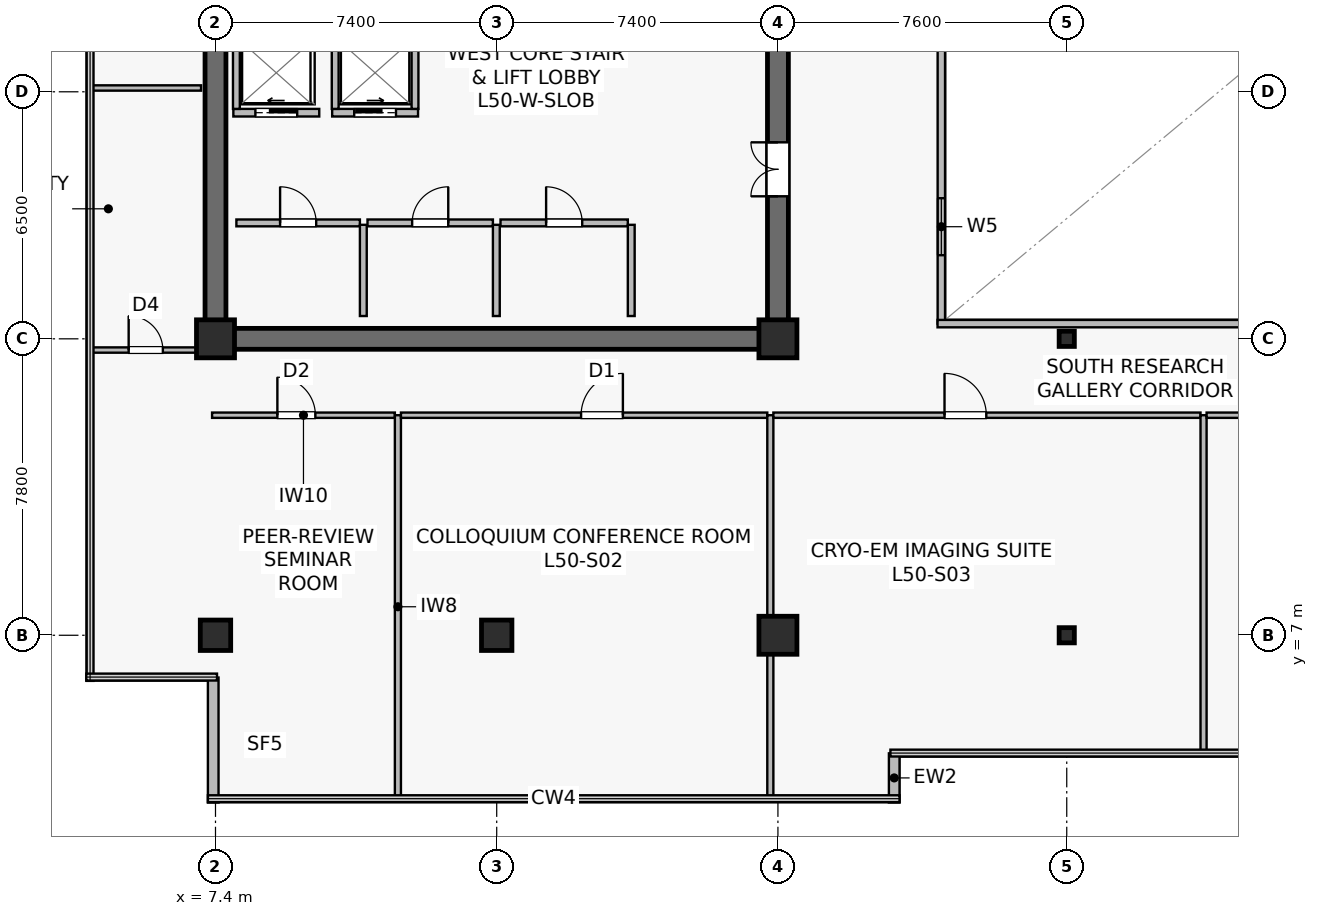
"""IFC4 building model, lengths in metres.
Left out: names, types, materials, properties, quantities, classifications, styles, units other than length and angle.
Written with IfcOpenShell. Run it as: python <this file> out.ifc"""

import sys

from ifc_helpers import new_model, si_unit, direction, frame, frame_2d, origin, origin_2d, place, context, subcontext, project, spatial, rectangle, hollow_rectangle, extrude, source, transform, mapped, element, fill, save


model = new_model("IFC4")
c1 = context("Model", 3, precision=1e-05, world=origin(), true_north=direction((0.0, 1.0)))
c2 = subcontext(c1, "Body", "Model", "MODEL_VIEW")
j1 = project(units=[si_unit("LENGTHUNIT", "METRE"), si_unit("PLANEANGLEUNIT", "RADIAN")], contexts=[c1])
p1 = place(None, origin())
s1 = spatial("IfcSite", under=j1, at=p1, CompositionType="ELEMENT")
p2 = place(p1, origin())
s2 = spatial("IfcBuilding", under=s1, at=p2, CompositionType="ELEMENT")
p3 = place(p2, frame((0.0, 0.0, 209.6)))
s3 = spatial("IfcBuildingStorey", under=s2, at=p3, CompositionType="ELEMENT", Elevation=209.6)
p4 = place(p3, frame((7.125, 14.8, 0.0), z_axis=(0.0, 0.0, 1.0), x_axis=(1.0, 0.0, 0.0)))
e1 = element("IfcWall", 1, at=p4, inside=s3, PredefinedType="SHEAR", context=c2, shape_type="SweptSolid", body=[
    extrude(rectangle(XDim=15.35, YDim=0.55, at=frame_2d((7.675, 0.0))), origin(), (0.0, 0.0, 1.0), 3.8),
])
p5 = place(p3, frame((7.4, 15.075, 0.0), z_axis=(0.0, 0.0, 1.0), x_axis=(0.0, 1.0, 0.0)))
e2 = element("IfcWall", 2, at=p5, inside=s3, PredefinedType="SHEAR", context=c2, shape_type="SweptSolid", body=[
    extrude(rectangle(XDim=18.45, YDim=0.55, at=frame_2d((9.225, 0.0))), origin(), (0.0, 0.0, 1.0), 3.8),
])
p6 = place(p3, frame((22.2, 15.075, 0.0), z_axis=(0.0, 0.0, 1.0), x_axis=(0.0, 1.0, 0.0)))
e3 = element("IfcWall", 3, at=p6, inside=s3, PredefinedType="SHEAR", context=c2, shape_type="SweptSolid", body=[
    extrude(rectangle(XDim=18.45, YDim=0.55, at=frame_2d((9.225, 0.0))), origin(), (0.0, 0.0, 1.0), 3.8),
])
p7 = place(p6, frame((3.475, 0.0, 0.0)))
e4 = element("IfcOpeningElement", 4, at=p7, cuts=e3, PredefinedType="OPENING", context=c2, shape_type="SweptSolid", body=[
    extrude(rectangle(XDim=1.42, YDim=2.2, at=frame_2d((0.71, 1.1))), frame((0.0, 0.285, 0.0), z_axis=(0.0, -1.0, 0.0), x_axis=(1.0, 0.0, 0.0)), (0.0, 0.0, 1.0), 0.57),
])
m1 = source(origin(), c2, "Body", "SweptSolid", [
    extrude(rectangle(XDim=0.8, YDim=0.8, at=origin_2d()), origin(), (0.0, 0.0, 1.0), 4.1),
])
p8 = place(p3, frame((14.8, 7.0, 0.0), z_axis=(0.0, 0.0, 1.0), x_axis=(1.0, 0.0, 0.0)))
e5 = element("IfcColumn", 5, at=p8, inside=s3, PredefinedType="COLUMN", context=c2, shape_type="MappedRepresentation", body=[
    mapped(m1, transform((0.0, 0.0, 0.0), scale=1.0)),
])
m2 = source(origin(), c2, "Body", "SweptSolid", [
    extrude(rectangle(XDim=1.0, YDim=1.0, at=origin_2d()), origin(), (0.0, 0.0, 1.0), 4.1),
])
for number, where, z_axis, x_axis in (
    (6, (22.2, 7.0, 0.0), (0.0, 0.0, 1.0), (1.0, 0.0, 0.0)),
    (7, (7.4, 14.8, 0.0), (0.0, 0.0, 1.0), (1.0, 0.0, 0.0)),
    (8, (22.2, 14.8, 0.0), (0.0, 0.0, 1.0), (1.0, 0.0, 0.0)),
):
    element("IfcColumn", number, at=place(p3, frame(where, z_axis=z_axis, x_axis=x_axis)), inside=s3, PredefinedType="COLUMN", context=c2, shape_type="MappedRepresentation", body=[
        mapped(m2, transform((0.0, 0.0, 0.0), scale=1.0)),
    ])
p9 = place(p3, frame((7.4, 7.0, 0.0), z_axis=(0.0, 0.0, 1.0), x_axis=(1.0, 0.0, 0.0)))
e9 = element("IfcColumn", 9, at=p9, inside=s3, PredefinedType="COLUMN", context=c2, shape_type="MappedRepresentation", body=[
    mapped(m1, transform((0.0, 0.0, 0.0), scale=1.0)),
])
m3 = source(origin(), c2, "Body", "SweptSolid", [
    extrude(hollow_rectangle(XDim=0.4, YDim=0.4, WallThickness=0.019, at=origin_2d()), origin(), (0.0, 0.0, 1.0), 4.1),
])
for number, where, z_axis, x_axis in (
    (10, (29.8, 7.0, 0.0), (0.0, 0.0, 1.0), (1.0, 0.0, 0.0)),
    (11, (29.8, 14.8, 0.0), (0.0, 0.0, 1.0), (1.0, 0.0, 0.0)),
):
    element("IfcColumn", number, at=place(p3, frame(where, z_axis=z_axis, x_axis=x_axis)), inside=s3, PredefinedType="COLUMN", context=c2, shape_type="MappedRepresentation", body=[
        mapped(m3, transform((0.0, 0.0, 0.0), scale=1.0)),
    ])
p10 = place(p3, frame((25.26, 2.6, 0.0), z_axis=(0.0, 0.0, 1.0), x_axis=(0.0, 1.0, 0.0)))
e12 = element("IfcWall", 12, at=p10, inside=s3, PredefinedType="STANDARD", context=c2, shape_type="SweptSolid", body=[
    extrude(rectangle(XDim=1.293, YDim=0.28, at=frame_2d((0.646, 0.0))), origin(), (0.0, 0.0, 1.0), 3.8),
])
p11 = place(p3, frame((7.34, 5.888, 0.0), z_axis=(0.0, 0.0, 1.0), x_axis=(0.0, -1.0, 0.0)))
e13 = element("IfcWall", 13, at=p11, inside=s3, PredefinedType="STANDARD", context=c2, shape_type="SweptSolid", body=[
    extrude(rectangle(XDim=3.288, YDim=0.28, at=frame_2d((1.644, 0.0))), origin(), (0.0, 0.0, 1.0), 3.8),
])
p12 = place(p3, frame((7.87, 20.75, 0.0), z_axis=(0.0, 0.0, 1.0), x_axis=(1.0, 0.0, 0.0)))
e14 = element("IfcWall", 14, at=p12, inside=s3, PredefinedType="SOLIDWALL", context=c2, shape_type="SweptSolid", body=[
    extrude(rectangle(XDim=2.26, YDim=0.2, at=frame_2d((1.13, 0.0))), origin(), (0.0, 0.0, 1.0), 3.8),
])
p13 = place(p12, frame((0.58, 0.0, 0.0)))
e15 = element("IfcOpeningElement", 15, at=p13, cuts=e14, PredefinedType="OPENING", context=c2, shape_type="SweptSolid", body=[
    extrude(rectangle(XDim=1.1, YDim=2.22, at=frame_2d((0.55, 1.11))), frame((0.0, 0.11, 0.0), z_axis=(0.0, -1.0, 0.0), x_axis=(1.0, 0.0, 0.0)), (0.0, 0.0, 1.0), 0.22),
])
p14 = place(p3, frame((7.95, 20.85, 0.0), z_axis=(0.0, 0.0, 1.0), x_axis=(0.0, 1.0, 0.0)))
e16 = element("IfcWall", 16, at=p14, inside=s3, PredefinedType="SOLIDWALL", context=c2, shape_type="SweptSolid", body=[
    extrude(rectangle(XDim=1.9, YDim=0.18, at=frame_2d((0.95, 0.0))), origin(), (0.0, 0.0, 1.0), 3.8),
])
p15 = place(p3, frame((10.47, 20.75, 0.0), z_axis=(0.0, 0.0, 1.0), x_axis=(1.0, 0.0, 0.0)))
e17 = element("IfcWall", 17, at=p15, inside=s3, PredefinedType="SOLIDWALL", context=c2, shape_type="SweptSolid", body=[
    extrude(rectangle(XDim=2.26, YDim=0.2, at=frame_2d((1.13, 0.0))), origin(), (0.0, 0.0, 1.0), 3.8),
])
p16 = place(p15, frame((0.58, 0.0, 0.0)))
e18 = element("IfcOpeningElement", 18, at=p16, cuts=e17, PredefinedType="OPENING", context=c2, shape_type="SweptSolid", body=[
    extrude(rectangle(XDim=1.1, YDim=2.22, at=frame_2d((0.55, 1.11))), frame((0.0, 0.11, 0.0), z_axis=(0.0, -1.0, 0.0), x_axis=(1.0, 0.0, 0.0)), (0.0, 0.0, 1.0), 0.22),
])
for number, where, z_axis, x_axis in (
    (19, (10.55, 20.85, 0.0), (0.0, 0.0, 1.0), (0.0, 1.0, 0.0)),
    (20, (12.65, 20.85, 0.0), (0.0, 0.0, 1.0), (0.0, 1.0, 0.0)),
):
    element("IfcWall", number, at=place(p3, frame(where, z_axis=z_axis, x_axis=x_axis)), inside=s3, PredefinedType="SOLIDWALL", context=c2, shape_type="SweptSolid", body=[
        extrude(rectangle(XDim=1.9, YDim=0.18, at=frame_2d((0.95, 0.0))), origin(), (0.0, 0.0, 1.0), 3.8),
    ])
p17 = place(p3, frame((7.95, 17.85, 0.0), z_axis=(0.0, 0.0, 1.0), x_axis=(1.0, 0.0, 0.0)))
e21 = element("IfcWall", 21, at=p17, inside=s3, PredefinedType="SOLIDWALL", context=c2, shape_type="SweptSolid", body=[
    extrude(rectangle(XDim=3.25, YDim=0.18, at=frame_2d((1.625, 0.0))), origin(), (0.0, 0.0, 1.0), 3.8),
])
p18 = place(p17, frame((1.15, 0.0, 0.0)))
e22 = element("IfcOpeningElement", 22, at=p18, cuts=e21, PredefinedType="OPENING", context=c2, shape_type="SweptSolid", body=[
    extrude(rectangle(XDim=0.95, YDim=2.15, at=frame_2d((0.475, 1.075))), frame((0.0, 0.1, 0.0), z_axis=(0.0, -1.0, 0.0), x_axis=(1.0, 0.0, 0.0)), (0.0, 0.0, 1.0), 0.2),
])
p19 = place(p3, frame((11.29, 15.4, 0.0), z_axis=(0.0, 0.0, 1.0), x_axis=(0.0, 1.0, 0.0)))
e23 = element("IfcWall", 23, at=p19, inside=s3, PredefinedType="SOLIDWALL", context=c2, shape_type="SweptSolid", body=[
    extrude(rectangle(XDim=2.4, YDim=0.18, at=frame_2d((1.2, 0.0))), origin(), (0.0, 0.0, 1.0), 3.8),
])
p20 = place(p3, frame((11.4, 17.85, 0.0), z_axis=(0.0, 0.0, 1.0), x_axis=(1.0, 0.0, 0.0)))
e24 = element("IfcWall", 24, at=p20, inside=s3, PredefinedType="SOLIDWALL", context=c2, shape_type="SweptSolid", body=[
    extrude(rectangle(XDim=3.3, YDim=0.18, at=frame_2d((1.65, 0.0))), origin(), (0.0, 0.0, 1.0), 3.197),
])
p21 = place(p20, frame((1.175, 0.0, 0.0)))
e25 = element("IfcOpeningElement", 25, at=p21, cuts=e24, PredefinedType="OPENING", context=c2, shape_type="SweptSolid", body=[
    extrude(rectangle(XDim=0.95, YDim=2.15, at=frame_2d((0.475, 1.075))), frame((0.0, 0.1, 0.0), z_axis=(0.0, -1.0, 0.0), x_axis=(1.0, 0.0, 0.0)), (0.0, 0.0, 1.0), 0.2),
])
p22 = place(p3, frame((14.79, 15.4, 0.0), z_axis=(0.0, 0.0, 1.0), x_axis=(0.0, 1.0, 0.0)))
e26 = element("IfcWall", 26, at=p22, inside=s3, PredefinedType="SOLIDWALL", context=c2, shape_type="SweptSolid", body=[
    extrude(rectangle(XDim=2.4, YDim=0.18, at=frame_2d((1.2, 0.0))), origin(), (0.0, 0.0, 1.0), 3.197),
])
p23 = place(p3, frame((14.9, 17.85, 0.0), z_axis=(0.0, 0.0, 1.0), x_axis=(1.0, 0.0, 0.0)))
e27 = element("IfcWall", 27, at=p23, inside=s3, PredefinedType="SOLIDWALL", context=c2, shape_type="SweptSolid", body=[
    extrude(rectangle(XDim=3.35, YDim=0.18, at=frame_2d((1.675, 0.0))), origin(), (0.0, 0.0, 1.0), 3.197),
])
p24 = place(p23, frame((1.2, 0.0, 0.0)))
e28 = element("IfcOpeningElement", 28, at=p24, cuts=e27, PredefinedType="OPENING", context=c2, shape_type="SweptSolid", body=[
    extrude(rectangle(XDim=0.95, YDim=2.15, at=frame_2d((0.475, 1.075))), frame((0.0, 0.1, 0.0), z_axis=(0.0, -1.0, 0.0), x_axis=(1.0, 0.0, 0.0)), (0.0, 0.0, 1.0), 0.2),
])
p25 = place(p3, frame((18.34, 15.4, 0.0), z_axis=(0.0, 0.0, 1.0), x_axis=(0.0, 1.0, 0.0)))
e29 = element("IfcWall", 29, at=p25, inside=s3, PredefinedType="SOLIDWALL", context=c2, shape_type="SweptSolid", body=[
    extrude(rectangle(XDim=2.4, YDim=0.18, at=frame_2d((1.2, 0.0))), origin(), (0.0, 0.0, 1.0), 3.8),
])
p26 = place(p3, frame((26.5, 15.2, 0.0), z_axis=(0.0, 0.0, 1.0), x_axis=(0.0, 1.0, 0.0)))
e30 = element("IfcWall", 30, at=p26, inside=s3, PredefinedType="SOLIDWALL", context=c2, shape_type="SweptSolid", body=[
    extrude(rectangle(XDim=18.2, YDim=0.195, at=frame_2d((9.1, 0.0))), origin(), (0.0, 0.0, 1.0), 3.8),
])
p27 = place(p26, frame((1.8, 0.0, 0.9)))
e31 = element("IfcOpeningElement", 31, at=p27, cuts=e30, PredefinedType="OPENING", context=c2, shape_type="SweptSolid", body=[
    extrude(rectangle(XDim=1.5, YDim=1.4, at=frame_2d((0.75, 0.7))), frame((0.0, 0.107, 0.0), z_axis=(0.0, -1.0, 0.0), x_axis=(1.0, 0.0, 0.0)), (0.0, 0.0, 1.0), 0.215),
])
p28 = place(p26, frame((13.2, 0.0, 0.9)))
e32 = element("IfcOpeningElement", 32, at=p28, cuts=e30, PredefinedType="OPENING", context=c2, shape_type="SweptSolid", body=[
    extrude(rectangle(XDim=1.5, YDim=1.4, at=frame_2d((0.75, 0.7))), frame((0.0, 0.107, 0.0), z_axis=(0.0, -1.0, 0.0), x_axis=(1.0, 0.0, 0.0)), (0.0, 0.0, 1.0), 0.215),
])
p29 = place(p3, frame((26.4, 15.2, 0.0), z_axis=(0.0, 0.0, 1.0), x_axis=(1.0, 0.0, 0.0)))
e33 = element("IfcWall", 33, at=p29, inside=s3, PredefinedType="SOLIDWALL", context=c2, shape_type="SweptSolid", body=[
    extrude(rectangle(XDim=22.0, YDim=0.195, at=frame_2d((11.0, 0.0))), origin(), (0.0, 0.0, 1.0), 3.8),
])
p30 = place(p3, frame((7.31, 12.79, 0.0), z_axis=(0.0, 0.0, 1.0), x_axis=(1.0, 0.0, 0.0)))
e34 = element("IfcWall", 34, at=p30, inside=s3, PredefinedType="PARTITIONING", context=c2, shape_type="SweptSolid", body=[
    extrude(rectangle(XDim=4.81, YDim=0.14, at=frame_2d((2.405, 0.0))), origin(), (0.0, 0.0, 1.0), 3.335),
])
p31 = place(p30, frame((1.719, 0.0, 0.0)))
e35 = element("IfcOpeningElement", 35, at=p31, cuts=e34, PredefinedType="OPENING", context=c2, shape_type="SweptSolid", body=[
    extrude(rectangle(XDim=1.0, YDim=2.15, at=frame_2d((0.5, 1.075))), frame((0.0, 0.08, 0.0), z_axis=(0.0, -1.0, 0.0), x_axis=(1.0, 0.0, 0.0)), (0.0, 0.0, 1.0), 0.16),
])
p32 = place(p3, frame((12.2, 2.71, 0.0), z_axis=(0.0, 0.0, 1.0), x_axis=(0.0, 1.0, 0.0)))
e36 = element("IfcWall", 36, at=p32, inside=s3, PredefinedType="PARTITIONING", context=c2, shape_type="SweptSolid", body=[
    extrude(rectangle(XDim=10.08, YDim=0.16, at=frame_2d((5.04, 0.0))), origin(), (0.0, 0.0, 1.0), 3.135),
])
p33 = place(p3, frame((12.28, 12.79, 0.0), z_axis=(0.0, 0.0, 1.0), x_axis=(1.0, 0.0, 0.0)))
e37 = element("IfcWall", 37, at=p33, inside=s3, PredefinedType="PARTITIONING", context=c2, shape_type="SweptSolid", body=[
    extrude(rectangle(XDim=9.64, YDim=0.14, at=frame_2d((4.82, 0.0))), origin(), (0.0, 0.0, 1.0), 3.197),
])
p34 = place(p33, frame((4.74, 0.0, 0.0)))
e38 = element("IfcOpeningElement", 38, at=p34, cuts=e37, PredefinedType="OPENING", context=c2, shape_type="SweptSolid", body=[
    extrude(rectangle(XDim=1.1, YDim=2.18, at=frame_2d((0.55, 1.09))), frame((0.0, 0.08, 0.0), z_axis=(0.0, -1.0, 0.0), x_axis=(1.0, 0.0, 0.0)), (0.0, 0.0, 1.0), 0.16),
])
p35 = place(p3, frame((22.0, 2.71, 0.0), z_axis=(0.0, 0.0, 1.0), x_axis=(0.0, 1.0, 0.0)))
e39 = element("IfcWall", 39, at=p35, inside=s3, PredefinedType="PARTITIONING", context=c2, shape_type="SweptSolid", body=[
    extrude(rectangle(XDim=10.08, YDim=0.16, at=frame_2d((5.04, 0.0))), origin(), (0.0, 0.0, 1.0), 3.135),
])
p36 = place(p3, frame((22.08, 12.79, 0.0), z_axis=(0.0, 0.0, 1.0), x_axis=(1.0, 0.0, 0.0)))
e40 = element("IfcWall", 40, at=p36, inside=s3, PredefinedType="PARTITIONING", context=c2, shape_type="SweptSolid", body=[
    extrude(rectangle(XDim=11.24, YDim=0.14, at=frame_2d((5.62, 0.0))), origin(), (0.0, 0.0, 1.0), 3.197),
])
p37 = place(p36, frame((4.504, 0.0, 0.0)))
e41 = element("IfcOpeningElement", 41, at=p37, cuts=e40, PredefinedType="OPENING", context=c2, shape_type="SweptSolid", body=[
    extrude(rectangle(XDim=1.1, YDim=2.18, at=frame_2d((0.55, 1.09))), frame((0.0, 0.08, 0.0), z_axis=(0.0, -1.0, 0.0), x_axis=(1.0, 0.0, 0.0)), (0.0, 0.0, 1.0), 0.16),
])
p38 = place(p3, frame((33.4, 3.91, 0.0), z_axis=(0.0, 0.0, 1.0), x_axis=(0.0, 1.0, 0.0)))
e42 = element("IfcWall", 42, at=p38, inside=s3, PredefinedType="PARTITIONING", context=c2, shape_type="SweptSolid", body=[
    extrude(rectangle(XDim=8.88, YDim=0.16, at=frame_2d((4.44, 0.0))), origin(), (0.0, 0.0, 1.0), 3.135),
])
p39 = place(p3, frame((33.48, 12.79, 0.0), z_axis=(0.0, 0.0, 1.0), x_axis=(1.0, 0.0, 0.0)))
e43 = element("IfcWall", 43, at=p39, inside=s3, PredefinedType="PARTITIONING", context=c2, shape_type="SweptSolid", body=[
    extrude(rectangle(XDim=11.64, YDim=0.14, at=frame_2d((5.82, 0.0))), origin(), (0.0, 0.0, 1.0), 3.197),
])
p40 = place(p39, frame((5.86, 0.0, 0.0)))
e44 = element("IfcOpeningElement", 44, at=p40, cuts=e43, PredefinedType="OPENING", context=c2, shape_type="SweptSolid", body=[
    extrude(rectangle(XDim=1.1, YDim=2.18, at=frame_2d((0.55, 1.09))), frame((0.0, 0.08, 0.0), z_axis=(0.0, -1.0, 0.0), x_axis=(1.0, 0.0, 0.0)), (0.0, 0.0, 1.0), 0.16),
])
p41 = place(p3, frame((4.11, 21.4, 0.0), z_axis=(0.0, 0.0, 1.0), x_axis=(1.0, 0.0, 0.0)))
e45 = element("IfcWall", 45, at=p41, inside=s3, PredefinedType="PARTITIONING", context=c2, shape_type="SweptSolid", body=[
    extrude(rectangle(XDim=2.91, YDim=0.14, at=frame_2d((1.455, 0.0))), origin(), (0.0, 0.0, 1.0), 3.8),
])
p42 = place(p3, frame((4.11, 14.505, 0.0), z_axis=(0.0, 0.0, 1.0), x_axis=(1.0, 0.0, 0.0)))
e46 = element("IfcWall", 46, at=p42, inside=s3, PredefinedType="PARTITIONING", context=c2, shape_type="SweptSolid", body=[
    extrude(rectangle(XDim=2.91, YDim=0.14, at=frame_2d((1.455, 0.0))), origin(), (0.0, 0.0, 1.0), 3.8),
])
p43 = place(p42, frame((1.005, 0.0, 0.0)))
e47 = element("IfcOpeningElement", 47, at=p43, cuts=e46, PredefinedType="OPENING", context=c2, shape_type="SweptSolid", body=[
    extrude(rectangle(XDim=0.9, YDim=2.1, at=frame_2d((0.45, 1.05))), frame((0.0, 0.08, 0.0), z_axis=(0.0, -1.0, 0.0), x_axis=(1.0, 0.0, 0.0)), (0.0, 0.0, 1.0), 0.16),
])
m4 = source(origin(), c2, "Body", "SweptSolid", [
    extrude(rectangle(XDim=1.5, YDim=1.4, at=frame_2d((0.75, 0.7))), frame((0.0, 0.03, 0.0), z_axis=(0.0, -1.0, 0.0), x_axis=(1.0, 0.0, 0.0)), (0.0, 0.0, 1.0), 0.06),
])
p44 = place(p27, origin())
e48 = element("IfcWindow", 48, at=p44, inside=s3, PartitioningType="SINGLE_PANEL", PredefinedType="WINDOW", context=c2, shape_type="MappedRepresentation", body=[
    mapped(m4, transform((0.0, 0.0, 0.0), scale=1.0)),
])
fill(e31, e48)
m5 = source(origin(), c2, "Body", "SweptSolid", [
    extrude(rectangle(XDim=1.1, YDim=2.22, at=frame_2d((0.55, 1.11))), frame((0.0, 0.025, 0.0), z_axis=(0.0, -1.0, 0.0), x_axis=(1.0, 0.0, 0.0)), (0.0, 0.0, 1.0), 0.05),
])
p45 = place(p13, origin())
e49 = element("IfcDoor", 49, at=p45, inside=s3, OperationType="SLIDING_TO_LEFT", PredefinedType="USERDEFINED", context=c2, shape_type="MappedRepresentation", body=[
    mapped(m5, transform((0.0, 0.0, 0.0), scale=1.0)),
])
fill(e15, e49)
p46 = place(p16, origin())
e50 = element("IfcDoor", 50, at=p46, inside=s3, OperationType="SLIDING_TO_RIGHT", PredefinedType="USERDEFINED", context=c2, shape_type="MappedRepresentation", body=[
    mapped(m5, transform((0.0, 0.0, 0.0), scale=1.0)),
])
fill(e18, e50)
m6 = source(origin(), c2, "Body", "SweptSolid", [
    extrude(rectangle(XDim=0.95, YDim=2.15, at=frame_2d((0.475, 1.075))), frame((0.0, 0.025, 0.0), z_axis=(0.0, -1.0, 0.0), x_axis=(1.0, 0.0, 0.0)), (0.0, 0.0, 1.0), 0.05),
])
p47 = place(p18, origin())
e51 = element("IfcDoor", 51, at=p47, inside=s3, OperationType="SINGLE_SWING_LEFT", PredefinedType="DOOR", context=c2, shape_type="MappedRepresentation", body=[
    mapped(m6, transform((0.0, 0.0, 0.0), scale=1.0)),
])
fill(e22, e51)
p48 = place(p21, origin())
e52 = element("IfcDoor", 52, at=p48, inside=s3, OperationType="SINGLE_SWING_RIGHT", PredefinedType="DOOR", context=c2, shape_type="MappedRepresentation", body=[
    mapped(m6, transform((0.0, 0.0, 0.0), scale=1.0)),
])
fill(e25, e52)
p49 = place(p24, origin())
e53 = element("IfcDoor", 53, at=p49, inside=s3, OperationType="SINGLE_SWING_LEFT", PredefinedType="DOOR", context=c2, shape_type="MappedRepresentation", body=[
    mapped(m6, transform((0.0, 0.0, 0.0), scale=1.0)),
])
fill(e28, e53)
m7 = source(origin(), c2, "Body", "SweptSolid", [
    extrude(rectangle(XDim=1.42, YDim=2.2, at=frame_2d((0.71, 1.1))), frame((0.0, 0.025, 0.0), z_axis=(0.0, -1.0, 0.0), x_axis=(1.0, 0.0, 0.0)), (0.0, 0.0, 1.0), 0.05),
])
p50 = place(p7, origin())
e54 = element("IfcDoor", 54, at=p50, inside=s3, OperationType="DOUBLE_DOOR_SINGLE_SWING", PredefinedType="DOOR", context=c2, shape_type="MappedRepresentation", body=[
    mapped(m7, transform((0.0, 0.0, 0.0), scale=1.0)),
])
fill(e4, e54)
m8 = source(origin(), c2, "Body", "SweptSolid", [
    extrude(rectangle(XDim=1.0, YDim=2.15, at=frame_2d((0.5, 1.075))), frame((0.0, 0.025, 0.0), z_axis=(0.0, -1.0, 0.0), x_axis=(1.0, 0.0, 0.0)), (0.0, 0.0, 1.0), 0.05),
])
p51 = place(p31, origin())
e55 = element("IfcDoor", 55, at=p51, inside=s3, OperationType="SINGLE_SWING_LEFT", PredefinedType="DOOR", context=c2, shape_type="MappedRepresentation", body=[
    mapped(m8, transform((0.0, 0.0, 0.0), scale=1.0)),
])
fill(e35, e55)
m9 = source(origin(), c2, "Body", "SweptSolid", [
    extrude(rectangle(XDim=1.1, YDim=2.18, at=frame_2d((0.55, 1.09))), frame((0.0, 0.025, 0.0), z_axis=(0.0, -1.0, 0.0), x_axis=(1.0, 0.0, 0.0)), (0.0, 0.0, 1.0), 0.05),
])
p52 = place(p34, origin())
e56 = element("IfcDoor", 56, at=p52, inside=s3, OperationType="SINGLE_SWING_RIGHT", PredefinedType="DOOR", context=c2, shape_type="MappedRepresentation", body=[
    mapped(m9, transform((0.0, 0.0, 0.0), scale=1.0)),
])
fill(e38, e56)
p53 = place(p37, origin())
e57 = element("IfcDoor", 57, at=p53, inside=s3, OperationType="SINGLE_SWING_LEFT", PredefinedType="DOOR", context=c2, shape_type="MappedRepresentation", body=[
    mapped(m9, transform((0.0, 0.0, 0.0), scale=1.0)),
])
fill(e41, e57)
m10 = source(origin(), c2, "Body", "SweptSolid", [
    extrude(rectangle(XDim=0.9, YDim=2.1, at=frame_2d((0.45, 1.05))), frame((0.0, 0.025, 0.0), z_axis=(0.0, -1.0, 0.0), x_axis=(1.0, 0.0, 0.0)), (0.0, 0.0, 1.0), 0.05),
])
p54 = place(p43, origin())
e58 = element("IfcDoor", 58, at=p54, inside=s3, OperationType="SINGLE_SWING_LEFT", PredefinedType="DOOR", context=c2, shape_type="MappedRepresentation", body=[
    mapped(m10, transform((0.0, 0.0, 0.0), scale=1.0)),
])
fill(e47, e58)
save(model, sys.argv[1])
